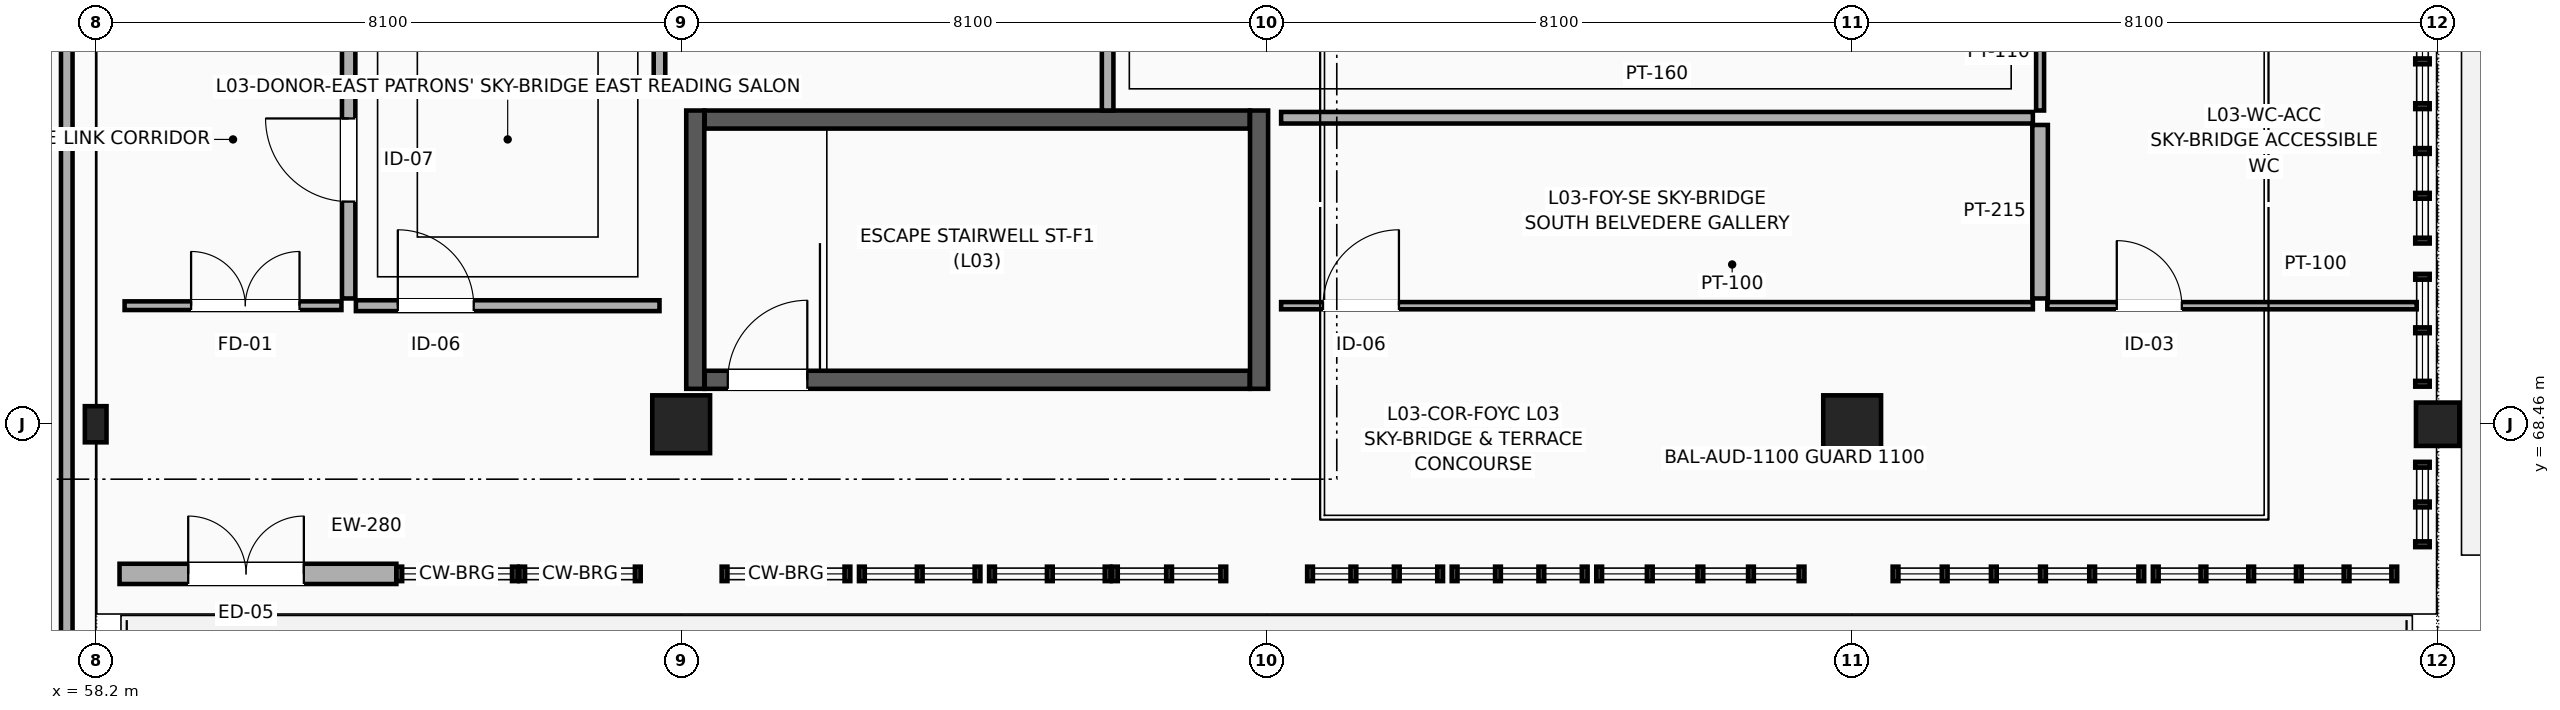
"""IFC4 building model, lengths in metres.
Left out: names, types, materials, properties, quantities, classifications, styles, units other than length and angle.
Written with IfcOpenShell. Run it as: python <this file> out.ifc"""

import sys

from ifc_helpers import new_model, si_unit, direction, frame, frame_2d, origin, origin_2d, place, context, subcontext, project, spatial, rectangle, i_section, extrude, element, fill, save


model = new_model("IFC4")
c1 = context("Model", 3, precision=1e-05, world=origin(), true_north=direction((0.0, 1.0)))
c2 = subcontext(c1, "Body", "Model", "MODEL_VIEW")
j1 = project(units=[si_unit("LENGTHUNIT", "METRE"), si_unit("PLANEANGLEUNIT", "RADIAN")], contexts=[c1])
p1 = place(None, origin())
s1 = spatial("IfcSite", under=j1, at=p1, CompositionType="ELEMENT")
p2 = place(p1, origin())
s2 = spatial("IfcBuilding", under=s1, at=p2, CompositionType="ELEMENT")
p3 = place(p2, frame((0.0, 0.0, 14.7)))
s3 = spatial("IfcBuildingStorey", under=s2, at=p3, CompositionType="ELEMENT", Elevation=14.7)
p4 = place(p3, frame((58.2, 68.46, 0.0), z_axis=(0.0, 0.0, 1.0), x_axis=(1.0, 0.0, 0.0)))
e1 = element("IfcColumn", 1, at=p4, inside=s3, PredefinedType="COLUMN", context=c2, shape_type="SweptSolid", body=[
    extrude(i_section(OverallWidth=0.3, OverallDepth=0.5, WebThickness=0.014, FlangeThickness=0.028, FilletRadius=0.027, at=origin_2d()), origin(), (0.0, 0.0, 1.0), 4.5),
])
for number, where, z_axis, x_axis in (
    (2, (66.3, 68.46, 0.0), (0.0, 0.0, 1.0), (1.0, 0.0, 0.0)),
    (3, (82.5, 68.46, 0.0), (0.0, 0.0, 1.0), (1.0, 0.0, 0.0)),
):
    element("IfcColumn", number, at=place(p3, frame(where, z_axis=z_axis, x_axis=x_axis)), inside=s3, PredefinedType="COLUMN", context=c2, shape_type="SweptSolid", body=[
        extrude(rectangle(XDim=0.8, YDim=0.8, at=origin_2d()), origin(), (0.0, 0.0, 1.0), 4.5),
    ])
p5 = place(p3, frame((90.6, 68.46, 0.0), z_axis=(0.0, 0.0, 1.0), x_axis=(1.0, 0.0, 0.0)))
e4 = element("IfcColumn", 4, at=p5, inside=s3, PredefinedType="COLUMN", context=c2, shape_type="SweptSolid", body=[
    extrude(rectangle(XDim=0.6, YDim=0.6, at=origin_2d()), origin(), (0.0, 0.0, 1.0), 4.5),
])
p6 = place(p3, frame((58.53, 66.39, 0.0), z_axis=(0.0, 0.0, 1.0), x_axis=(1.0, 0.0, 0.0)))
e5 = element("IfcWall", 5, at=p6, inside=s3, PredefinedType="SOLIDWALL", context=c2, shape_type="SweptSolid", body=[
    extrude(rectangle(XDim=3.83, YDim=0.28, at=frame_2d((1.915, 0.0))), origin(), (0.0, 0.0, 1.0), 4.225),
])
p7 = place(p6, frame((0.95, 0.0, 0.0)))
e6 = element("IfcOpeningElement", 6, at=p7, cuts=e5, PredefinedType="OPENING", context=c2, shape_type="SweptSolid", body=[
    extrude(rectangle(XDim=1.6, YDim=2.3, at=frame_2d((0.8, 1.15))), frame((0.0, 0.15, 0.0), z_axis=(0.0, -1.0, 0.0), x_axis=(1.0, 0.0, 0.0)), (0.0, 0.0, 1.0), 0.3),
])
p8 = place(p3, frame((66.625, 69.075, 0.0), z_axis=(0.0, 0.0, 1.0), x_axis=(1.0, 0.0, 0.0)))
e7 = element("IfcWall", 7, at=p8, inside=s3, PredefinedType="SHEAR", context=c2, shape_type="SweptSolid", body=[
    extrude(rectangle(XDim=7.54, YDim=0.25, at=frame_2d((3.77, 0.0))), origin(), (0.0, 0.0, 1.0), 4.245),
])
p9 = place(p8, frame((0.32, 0.0, 0.0)))
e8 = element("IfcOpeningElement", 8, at=p9, cuts=e7, PredefinedType="OPENING", context=c2, shape_type="SweptSolid", body=[
    extrude(rectangle(XDim=1.1, YDim=2.2, at=frame_2d((0.55, 1.1))), frame((0.0, 0.135, 0.0), z_axis=(0.0, -1.0, 0.0), x_axis=(1.0, 0.0, 0.0)), (0.0, 0.0, 1.0), 0.27),
])
p10 = place(p3, frame((66.625, 72.675, 0.0), z_axis=(0.0, 0.0, 1.0), x_axis=(1.0, 0.0, 0.0)))
e9 = element("IfcWall", 9, at=p10, inside=s3, PredefinedType="SHEAR", context=c2, shape_type="SweptSolid", body=[
    extrude(rectangle(XDim=7.54, YDim=0.25, at=frame_2d((3.77, 0.0))), origin(), (0.0, 0.0, 1.0), 4.245),
])
for number, where, z_axis, x_axis in (
    (10, (66.495, 68.95, 0.0), (0.0, 0.0, 1.0), (0.0, 1.0, 0.0)),
    (11, (74.295, 68.95, 0.0), (0.0, 0.0, 1.0), (0.0, 1.0, 0.0)),
):
    element("IfcWall", number, at=place(p3, frame(where, z_axis=z_axis, x_axis=x_axis)), inside=s3, PredefinedType="SHEAR", context=c2, shape_type="SweptSolid", body=[
        extrude(rectangle(XDim=3.85, YDim=0.25, at=frame_2d((1.925, 0.0))), origin(), (0.0, 0.0, 1.0), 4.245),
    ])
p11 = place(p3, frame((58.6, 70.1, 0.0), z_axis=(0.0, 0.0, 1.0), x_axis=(1.0, 0.0, 0.0)))
e12 = element("IfcWall", 12, at=p11, inside=s3, PredefinedType="PARTITIONING", context=c2, shape_type="SweptSolid", body=[
    extrude(rectangle(XDim=3.0, YDim=0.12, at=frame_2d((1.5, 0.0))), origin(), (0.0, 0.0, 1.0), 3.827),
])
p12 = place(p11, frame((0.92, 0.0, 0.0)))
e13 = element("IfcOpeningElement", 13, at=p12, cuts=e12, PredefinedType="OPENING", context=c2, shape_type="SweptSolid", body=[
    extrude(rectangle(XDim=1.5, YDim=2.2, at=frame_2d((0.75, 1.1))), frame((0.0, 0.07, 0.0), z_axis=(0.0, -1.0, 0.0), x_axis=(1.0, 0.0, 0.0)), (0.0, 0.0, 1.0), 0.14),
])
p13 = place(p3, frame((74.6, 70.1, 0.0), z_axis=(0.0, 0.0, 1.0), x_axis=(1.0, 0.0, 0.0)))
e14 = element("IfcWall", 14, at=p13, inside=s3, PredefinedType="PARTITIONING", context=c2, shape_type="SweptSolid", body=[
    extrude(rectangle(XDim=10.4, YDim=0.1, at=frame_2d((5.2, 0.0))), origin(), (0.0, 0.0, 1.0), 3.577),
])
p14 = place(p13, frame((0.58, 0.0, 0.0)))
e15 = element("IfcOpeningElement", 15, at=p14, cuts=e14, PredefinedType="OPENING", context=c2, shape_type="SweptSolid", body=[
    extrude(rectangle(XDim=1.05, YDim=2.25, at=frame_2d((0.525, 1.125))), frame((0.0, 0.06, 0.0), z_axis=(0.0, -1.0, 0.0), x_axis=(1.0, 0.0, 0.0)), (0.0, 0.0, 1.0), 0.12),
])
p15 = place(p3, frame((85.2, 70.1, 0.0), z_axis=(0.0, 0.0, 1.0), x_axis=(1.0, 0.0, 0.0)))
e16 = element("IfcWall", 16, at=p15, inside=s3, PredefinedType="PARTITIONING", context=c2, shape_type="SweptSolid", body=[
    extrude(rectangle(XDim=5.11, YDim=0.1, at=frame_2d((2.555, 0.0))), origin(), (0.0, 0.0, 1.0), 3.897),
])
p16 = place(p15, frame((0.961, 0.0, 0.0)))
e17 = element("IfcOpeningElement", 17, at=p16, cuts=e16, PredefinedType="OPENING", context=c2, shape_type="SweptSolid", body=[
    extrude(rectangle(XDim=0.9, YDim=2.1, at=frame_2d((0.45, 1.05))), frame((0.0, 0.06, 0.0), z_axis=(0.0, -1.0, 0.0), x_axis=(1.0, 0.0, 0.0)), (0.0, 0.0, 1.0), 0.12),
])
p17 = place(p3, frame((61.8, 70.1, 0.0), z_axis=(0.0, 0.0, 1.0), x_axis=(1.0, 0.0, 0.0)))
e18 = element("IfcWall", 18, at=p17, inside=s3, PredefinedType="MOVABLE", context=c2, shape_type="SweptSolid", body=[
    extrude(rectangle(XDim=4.2, YDim=0.15, at=frame_2d((2.1, 0.0))), origin(), (0.0, 0.0, 1.0), 3.777),
])
p18 = place(p17, frame((0.58, 0.0, 0.0)))
e19 = element("IfcOpeningElement", 19, at=p18, cuts=e18, PredefinedType="OPENING", context=c2, shape_type="SweptSolid", body=[
    extrude(rectangle(XDim=1.05, YDim=2.25, at=frame_2d((0.525, 1.125))), frame((0.0, 0.085, 0.0), z_axis=(0.0, -1.0, 0.0), x_axis=(1.0, 0.0, 0.0)), (0.0, 0.0, 1.0), 0.17),
])
p19 = place(p3, frame((61.7, 70.2, 0.0), z_axis=(0.0, 0.0, 1.0), x_axis=(0.0, 1.0, 0.0)))
e20 = element("IfcWall", 20, at=p19, inside=s3, PredefinedType="PARTITIONING", context=c2, shape_type="SweptSolid", body=[
    extrude(rectangle(XDim=4.4, YDim=0.185, at=frame_2d((2.2, 0.0))), origin(), (0.0, 0.0, 1.0), 4.225),
])
p20 = place(p19, frame((1.34, 0.0, 0.0)))
e21 = element("IfcOpeningElement", 21, at=p20, cuts=e20, PredefinedType="OPENING", context=c2, shape_type="SweptSolid", body=[
    extrude(rectangle(XDim=1.15, YDim=2.25, at=frame_2d((0.575, 1.125))), frame((0.0, 0.103, 0.0), z_axis=(0.0, -1.0, 0.0), x_axis=(1.0, 0.0, 0.0)), (0.0, 0.0, 1.0), 0.205),
])
p21 = place(p3, frame((74.6, 72.7, 0.0), z_axis=(0.0, 0.0, 1.0), x_axis=(1.0, 0.0, 0.0)))
e22 = element("IfcWall", 22, at=p21, inside=s3, PredefinedType="PARTITIONING", context=c2, shape_type="SweptSolid", body=[
    extrude(rectangle(XDim=10.4, YDim=0.16, at=frame_2d((5.2, 0.0))), origin(), (0.0, 0.0, 1.0), 3.577),
])
p22 = place(p3, frame((85.1, 72.8, 0.0), z_axis=(0.0, 0.0, 1.0), x_axis=(0.0, 1.0, 0.0)))
e23 = element("IfcWall", 23, at=p22, inside=s3, PredefinedType="PARTITIONING", context=c2, shape_type="SweptSolid", body=[
    extrude(rectangle(XDim=1.6, YDim=0.11, at=frame_2d((0.8, 0.0))), origin(), (0.0, 0.0, 1.0), 3.927),
])
p23 = place(p3, frame((85.1, 70.2, 0.0), z_axis=(0.0, 0.0, 1.0), x_axis=(0.0, 1.0, 0.0)))
e24 = element("IfcWall", 24, at=p23, inside=s3, PredefinedType="PARTITIONING", context=c2, shape_type="SweptSolid", body=[
    extrude(rectangle(XDim=2.4, YDim=0.215, at=frame_2d((1.2, 0.0))), origin(), (0.0, 0.0, 1.0), 3.927),
])
p24 = place(p3, frame((57.8, 61.4, 0.0), z_axis=(0.0, 0.0, 1.0), x_axis=(0.0, 1.0, 0.0)))
e25 = element("IfcWall", 25, at=p24, inside=s3, PredefinedType="PARTITIONING", context=c2, shape_type="SweptSolid", body=[
    extrude(rectangle(XDim=13.9, YDim=0.16, at=frame_2d((6.95, 0.0))), origin(), (0.0, 0.0, 1.0), 4.225),
])
p25 = place(p3, frame((72.2, 72.8, 0.0), z_axis=(0.0, 0.0, 1.0), x_axis=(0.0, 1.0, 0.0)))
e26 = element("IfcWall", 26, at=p25, inside=s3, PredefinedType="PARTITIONING", context=c2, shape_type="SweptSolid", body=[
    extrude(rectangle(XDim=1.75, YDim=0.16, at=frame_2d((0.875, 0.0))), origin(), (0.0, 0.0, 1.0), 4.225),
])
p26 = place(p3, frame((66.0, 73.05, 0.0), z_axis=(0.0, 0.0, 1.0), x_axis=(0.0, 1.0, 0.0)))
e27 = element("IfcWall", 27, at=p26, inside=s3, PredefinedType="PARTITIONING", context=c2, shape_type="SweptSolid", body=[
    extrude(rectangle(XDim=1.55, YDim=0.16, at=frame_2d((0.775, 0.0))), origin(), (0.0, 0.0, 1.0), 4.225),
])
p27 = place(p7, origin())
e28 = element("IfcDoor", 28, at=p27, inside=s3, OperationType="DOUBLE_DOOR_SINGLE_SWING", PredefinedType="DOOR", context=c2, shape_type="SweptSolid", body=[
    extrude(rectangle(XDim=1.6, YDim=2.3, at=frame_2d((0.8, 1.15))), frame((0.0, 0.025, 0.0), z_axis=(0.0, -1.0, 0.0), x_axis=(1.0, 0.0, 0.0)), (0.0, 0.0, 1.0), 0.05),
])
fill(e6, e28)
p28 = place(p9, origin())
e29 = element("IfcDoor", 29, at=p28, inside=s3, OperationType="SINGLE_SWING_RIGHT", PredefinedType="DOOR", context=c2, shape_type="SweptSolid", body=[
    extrude(rectangle(XDim=1.1, YDim=2.2, at=frame_2d((0.55, 1.1))), frame((0.0, 0.025, 0.0), z_axis=(0.0, -1.0, 0.0), x_axis=(1.0, 0.0, 0.0)), (0.0, 0.0, 1.0), 0.05),
])
fill(e8, e29)
p29 = place(p12, origin())
e30 = element("IfcDoor", 30, at=p29, inside=s3, OperationType="DOUBLE_DOOR_SINGLE_SWING", PredefinedType="DOOR", context=c2, shape_type="SweptSolid", body=[
    extrude(rectangle(XDim=1.5, YDim=2.2, at=frame_2d((0.75, 1.1))), frame((0.0, 0.025, 0.0), z_axis=(0.0, -1.0, 0.0), x_axis=(1.0, 0.0, 0.0)), (0.0, 0.0, 1.0), 0.05),
])
fill(e13, e30)
p30 = place(p14, origin())
e31 = element("IfcDoor", 31, at=p30, inside=s3, OperationType="SINGLE_SWING_RIGHT", PredefinedType="DOOR", context=c2, shape_type="SweptSolid", body=[
    extrude(rectangle(XDim=1.05, YDim=2.25, at=frame_2d((0.525, 1.125))), frame((0.0, 0.025, 0.0), z_axis=(0.0, -1.0, 0.0), x_axis=(1.0, 0.0, 0.0)), (0.0, 0.0, 1.0), 0.05),
])
fill(e15, e31)
p31 = place(p16, origin())
e32 = element("IfcDoor", 32, at=p31, inside=s3, OperationType="SINGLE_SWING_LEFT", PredefinedType="DOOR", context=c2, shape_type="SweptSolid", body=[
    extrude(rectangle(XDim=0.9, YDim=2.1, at=frame_2d((0.45, 1.05))), frame((0.0, 0.025, 0.0), z_axis=(0.0, -1.0, 0.0), x_axis=(1.0, 0.0, 0.0)), (0.0, 0.0, 1.0), 0.05),
])
fill(e17, e32)
p32 = place(p18, origin())
e33 = element("IfcDoor", 33, at=p32, inside=s3, OperationType="SINGLE_SWING_LEFT", PredefinedType="DOOR", context=c2, shape_type="SweptSolid", body=[
    extrude(rectangle(XDim=1.05, YDim=2.25, at=frame_2d((0.525, 1.125))), frame((0.0, 0.025, 0.0), z_axis=(0.0, -1.0, 0.0), x_axis=(1.0, 0.0, 0.0)), (0.0, 0.0, 1.0), 0.05),
])
fill(e19, e33)
p33 = place(p20, origin())
e34 = element("IfcDoor", 34, at=p33, inside=s3, OperationType="SINGLE_SWING_RIGHT", PredefinedType="DOOR", context=c2, shape_type="SweptSolid", body=[
    extrude(rectangle(XDim=1.15, YDim=2.25, at=frame_2d((0.575, 1.125))), frame((0.0, 0.025, 0.0), z_axis=(0.0, -1.0, 0.0), x_axis=(1.0, 0.0, 0.0)), (0.0, 0.0, 1.0), 0.05),
])
fill(e21, e34)
save(model, sys.argv[1])
